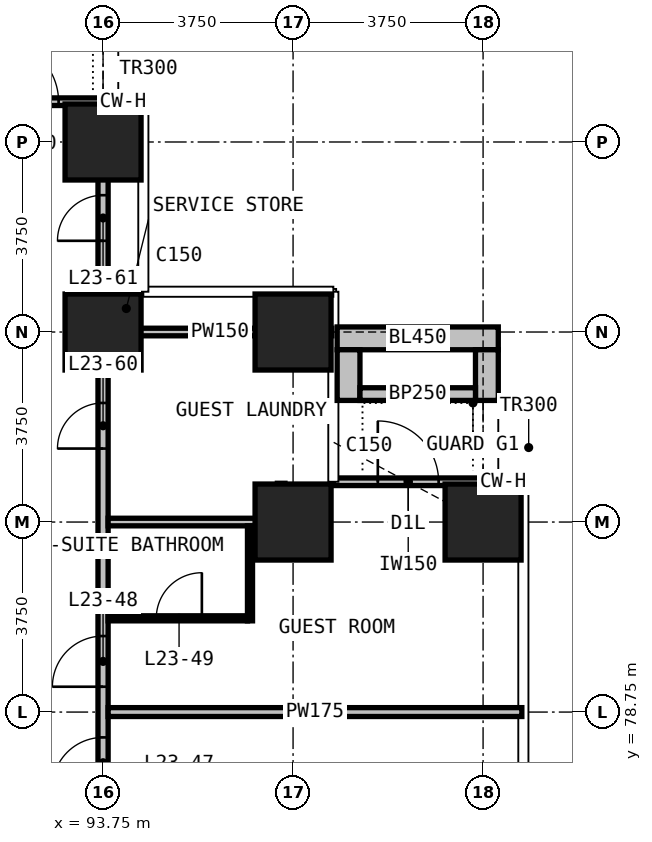
"""IFC4 building model, lengths in metres.
Left out: names, types, materials, properties, quantities, classifications, styles, units other than length and angle.
Written with IfcOpenShell. Run it as: python <this file> out.ifc"""

import sys

from ifc_helpers import new_model, si_unit, direction, frame, frame_2d, origin, origin_2d, place, context, subcontext, project, spatial, rectangle, extrude, element, fill, save


model = new_model("IFC4")
c1 = context("Model", 3, precision=1e-05, world=origin(), true_north=direction((0.0, 1.0)))
c2 = subcontext(c1, "Body", "Model", "MODEL_VIEW")
j1 = project(units=[si_unit("LENGTHUNIT", "METRE"), si_unit("PLANEANGLEUNIT", "RADIAN")], contexts=[c1])
p1 = place(None, origin())
s1 = spatial("IfcSite", under=j1, at=p1, CompositionType="ELEMENT")
p2 = place(p1, origin())
s2 = spatial("IfcBuilding", under=s1, at=p2, CompositionType="ELEMENT")
p3 = place(p2, frame((0.0, 0.0, 95.6)))
s3 = spatial("IfcBuildingStorey", under=s2, at=p3, CompositionType="ELEMENT", Elevation=95.6)
for number, where, z_axis, x_axis in (
    (1, (93.75, 86.25, 0.0), (0.0, 0.0, 1.0), (1.0, 0.0, 0.0)),
    (2, (93.75, 90.0, 0.0), (0.0, 0.0, 1.0), (1.0, 0.0, 0.0)),
    (3, (97.5, 82.5, 0.0), (0.0, 0.0, 1.0), (1.0, 0.0, 0.0)),
    (4, (97.5, 86.25, 0.0), (0.0, 0.0, 1.0), (1.0, 0.0, 0.0)),
    (5, (101.25, 82.5, 0.0), (0.0, 0.0, 1.0), (1.0, 0.0, 0.0)),
):
    element("IfcColumn", number, at=place(p3, frame(where, z_axis=z_axis, x_axis=x_axis)), inside=s3, PredefinedType="COLUMN", context=c2, shape_type="SweptSolid", body=[
        extrude(rectangle(XDim=1.5, YDim=1.5, at=origin_2d()), origin(), (0.0, 0.0, 1.0), 3.3),
    ])
p4 = place(p3, frame((98.295, 83.295, 0.0), z_axis=(0.0, 0.0, 1.0), x_axis=(1.0, 0.0, 0.0)))
e6 = element("IfcWall", 6, at=p4, inside=s3, PredefinedType="SOLIDWALL", context=c2, shape_type="SweptSolid", body=[
    extrude(rectangle(XDim=2.955, YDim=0.15, at=frame_2d((1.478, 0.0))), origin(), (0.0, 0.0, 1.0), 3.0),
])
p5 = place(p4, frame((0.877, 0.0, 0.0)))
e7 = element("IfcOpeningElement", 7, at=p5, cuts=e6, PredefinedType="OPENING", context=c2, shape_type="SweptSolid", body=[
    extrude(rectangle(XDim=1.2, YDim=2.0, at=frame_2d((0.6, 1.0))), frame((0.0, 0.085, 0.0), z_axis=(0.0, -1.0, 0.0), x_axis=(1.0, 0.0, 0.0)), (0.0, 0.0, 1.0), 0.17),
])
p6 = place(p3, frame((90.795, 90.795, 0.0), z_axis=(0.0, 0.0, 1.0), x_axis=(1.0, 0.0, 0.0)))
e8 = element("IfcWall", 8, at=p6, inside=s3, PredefinedType="SOLIDWALL", context=c2, shape_type="SweptSolid", body=[
    extrude(rectangle(XDim=2.955, YDim=0.15, at=frame_2d((1.478, 0.0))), origin(), (0.0, 0.0, 1.0), 3.0),
])
p7 = place(p6, frame((0.877, 0.0, 0.0)))
e9 = element("IfcOpeningElement", 9, at=p7, cuts=e8, PredefinedType="OPENING", context=c2, shape_type="SweptSolid", body=[
    extrude(rectangle(XDim=1.2, YDim=2.4, at=frame_2d((0.6, 1.2))), frame((0.0, 0.085, 0.0), z_axis=(0.0, -1.0, 0.0), x_axis=(1.0, 0.0, 0.0)), (0.0, 0.0, 1.0), 0.17),
])
p8 = place(p3, frame((98.37, 86.125, 0.0), z_axis=(0.0, 0.0, 1.0), x_axis=(1.0, 0.0, 0.0)))
e10 = element("IfcWall", 10, at=p8, inside=s3, PredefinedType="USERDEFINED", context=c2, shape_type="SweptSolid", body=[
    extrude(rectangle(XDim=3.18, YDim=0.45, at=frame_2d((1.59, 0.0))), origin(), (0.0, 0.0, 1.0), 1.1),
])
for number, where, z_axis, x_axis in (
    (11, (98.595, 84.9, 0.0), (0.0, 0.0, 1.0), (0.0, 1.0, 0.0)),
    (12, (101.325, 84.9, 0.0), (0.0, 0.0, 1.0), (0.0, 1.0, 0.0)),
):
    element("IfcWall", number, at=place(p3, frame(where, z_axis=z_axis, x_axis=x_axis)), inside=s3, PredefinedType="USERDEFINED", context=c2, shape_type="SweptSolid", body=[
        extrude(rectangle(XDim=1.0, YDim=0.45, at=frame_2d((0.5, 0.0))), origin(), (0.0, 0.0, 1.0), 1.1),
    ])
p9 = place(p3, frame((98.82, 85.025, 0.0), z_axis=(0.0, 0.0, 1.0), x_axis=(1.0, 0.0, 0.0)))
e13 = element("IfcWall", 13, at=p9, inside=s3, PredefinedType="USERDEFINED", context=c2, shape_type="SweptSolid", body=[
    extrude(rectangle(XDim=2.28, YDim=0.25, at=frame_2d((1.14, 0.0))), origin(), (0.0, 0.0, 1.0), 1.0),
])
p10 = place(p3, frame((93.75, 52.4, 0.0), z_axis=(0.0, 0.0, 1.0), x_axis=(0.0, 1.0, 0.0)))
e14 = element("IfcWall", 14, at=p10, inside=s3, PredefinedType="PARTITIONING", context=c2, shape_type="SweptSolid", body=[
    extrude(rectangle(XDim=38.31, YDim=0.2, at=frame_2d((19.155, 0.0))), origin(), (0.0, 0.0, 1.0), 3.0),
])
p11 = place(p10, frame((5.5, 0.0, 0.0)))
e15 = element("IfcOpeningElement", 15, at=p11, cuts=e14, PredefinedType="OPENING", context=c2, shape_type="SweptSolid", body=[
    extrude(rectangle(XDim=1.0, YDim=2.2, at=frame_2d((0.5, 1.1))), frame((0.0, 0.11, 0.0), z_axis=(0.0, -1.0, 0.0), x_axis=(1.0, 0.0, 0.0)), (0.0, 0.0, 1.0), 0.22),
])
p12 = place(p10, frame((8.1, 0.0, 0.0)))
e16 = element("IfcOpeningElement", 16, at=p12, cuts=e14, PredefinedType="OPENING", context=c2, shape_type="SweptSolid", body=[
    extrude(rectangle(XDim=1.0, YDim=2.2, at=frame_2d((0.5, 1.1))), frame((0.0, 0.11, 0.0), z_axis=(0.0, -1.0, 0.0), x_axis=(1.0, 0.0, 0.0)), (0.0, 0.0, 1.0), 0.22),
])
p13 = place(p10, frame((13.6, 0.0, 0.0)))
e17 = element("IfcOpeningElement", 17, at=p13, cuts=e14, PredefinedType="OPENING", context=c2, shape_type="SweptSolid", body=[
    extrude(rectangle(XDim=1.0, YDim=2.2, at=frame_2d((0.5, 1.1))), frame((0.0, 0.11, 0.0), z_axis=(0.0, -1.0, 0.0), x_axis=(1.0, 0.0, 0.0)), (0.0, 0.0, 1.0), 0.22),
])
p14 = place(p10, frame((16.2, 0.0, 0.0)))
e18 = element("IfcOpeningElement", 18, at=p14, cuts=e14, PredefinedType="OPENING", context=c2, shape_type="SweptSolid", body=[
    extrude(rectangle(XDim=1.0, YDim=2.2, at=frame_2d((0.5, 1.1))), frame((0.0, 0.11, 0.0), z_axis=(0.0, -1.0, 0.0), x_axis=(1.0, 0.0, 0.0)), (0.0, 0.0, 1.0), 0.22),
])
p15 = place(p10, frame((24.85, 0.0, 0.0)))
e19 = element("IfcOpeningElement", 19, at=p15, cuts=e14, PredefinedType="OPENING", context=c2, shape_type="SweptSolid", body=[
    extrude(rectangle(XDim=1.0, YDim=2.2, at=frame_2d((0.5, 1.1))), frame((0.0, 0.11, 0.0), z_axis=(0.0, -1.0, 0.0), x_axis=(1.0, 0.0, 0.0)), (0.0, 0.0, 1.0), 0.22),
])
p16 = place(p10, frame((26.85, 0.0, 0.0)))
e20 = element("IfcOpeningElement", 20, at=p16, cuts=e14, PredefinedType="OPENING", context=c2, shape_type="SweptSolid", body=[
    extrude(rectangle(XDim=1.0, YDim=2.2, at=frame_2d((0.5, 1.1))), frame((0.0, 0.11, 0.0), z_axis=(0.0, -1.0, 0.0), x_axis=(1.0, 0.0, 0.0)), (0.0, 0.0, 1.0), 0.22),
])
p17 = place(p10, frame((31.55, 0.0, 0.0)))
e21 = element("IfcOpeningElement", 21, at=p17, cuts=e14, PredefinedType="OPENING", context=c2, shape_type="SweptSolid", body=[
    extrude(rectangle(XDim=0.9, YDim=2.2, at=frame_2d((0.45, 1.1))), frame((0.0, 0.11, 0.0), z_axis=(0.0, -1.0, 0.0), x_axis=(1.0, 0.0, 0.0)), (0.0, 0.0, 1.0), 0.22),
])
p18 = place(p10, frame((35.65, 0.0, 0.0)))
e22 = element("IfcOpeningElement", 22, at=p18, cuts=e14, PredefinedType="OPENING", context=c2, shape_type="SweptSolid", body=[
    extrude(rectangle(XDim=0.9, YDim=2.2, at=frame_2d((0.45, 1.1))), frame((0.0, 0.11, 0.0), z_axis=(0.0, -1.0, 0.0), x_axis=(1.0, 0.0, 0.0)), (0.0, 0.0, 1.0), 0.22),
])
p19 = place(p3, frame((93.85, 78.75, 0.0), z_axis=(0.0, 0.0, 1.0), x_axis=(1.0, 0.0, 0.0)))
e23 = element("IfcWall", 23, at=p19, inside=s3, PredefinedType="PARTITIONING", context=c2, shape_type="SweptSolid", body=[
    extrude(rectangle(XDim=8.165, YDim=0.175, at=frame_2d((4.083, 0.0))), origin(), (0.0, 0.0, 1.0), 3.0),
])
p20 = place(p3, frame((93.85, 82.5, 0.0), z_axis=(0.0, 0.0, 1.0), x_axis=(1.0, 0.0, 0.0)))
e24 = element("IfcWall", 24, at=p20, inside=s3, PredefinedType="PARTITIONING", context=c2, shape_type="SweptSolid", body=[
    extrude(rectangle(XDim=3.34, YDim=0.15, at=frame_2d((1.67, 0.0))), origin(), (0.0, 0.0, 1.0), 3.0),
])
p21 = place(p3, frame((93.85, 86.25, 0.0), z_axis=(0.0, 0.0, 1.0), x_axis=(1.0, 0.0, 0.0)))
e25 = element("IfcWall", 25, at=p21, inside=s3, PredefinedType="PARTITIONING", context=c2, shape_type="SweptSolid", body=[
    extrude(rectangle(XDim=4.415, YDim=0.15, at=frame_2d((2.208, 0.0))), origin(), (0.0, 0.0, 1.0), 3.0),
])
p22 = place(p3, frame((97.265, 82.425, 0.0), z_axis=(0.0, 0.0, 1.0), x_axis=(0.0, 1.0, 0.0)))
e26 = element("IfcWall", 26, at=p22, inside=s3, PredefinedType="PARTITIONING", context=c2, shape_type="SweptSolid", body=[
    extrude(rectangle(XDim=0.84, YDim=0.15, at=frame_2d((0.42, 0.0))), origin(), (0.0, 0.0, 1.0), 3.0),
])
p23 = place(p3, frame((93.85, 80.6, 0.0), z_axis=(0.0, 0.0, 1.0), x_axis=(1.0, 0.0, 0.0)))
e27 = element("IfcWall", 27, at=p23, inside=s3, PredefinedType="PARTITIONING", context=c2, shape_type="SweptSolid", body=[
    extrude(rectangle(XDim=2.75, YDim=0.1, at=frame_2d((1.375, 0.0))), origin(), (0.0, 0.0, 1.0), 3.0),
])
p24 = place(p23, frame((0.95, 0.0, 0.0)))
e28 = element("IfcOpeningElement", 28, at=p24, cuts=e27, PredefinedType="OPENING", context=c2, shape_type="SweptSolid", body=[
    extrude(rectangle(XDim=0.9, YDim=2.2, at=frame_2d((0.45, 1.1))), frame((0.0, 0.06, 0.0), z_axis=(0.0, -1.0, 0.0), x_axis=(1.0, 0.0, 0.0)), (0.0, 0.0, 1.0), 0.12),
])
p25 = place(p3, frame((96.65, 80.55, 0.0), z_axis=(0.0, 0.0, 1.0), x_axis=(0.0, 1.0, 0.0)))
e29 = element("IfcWall", 29, at=p25, inside=s3, PredefinedType="PARTITIONING", context=c2, shape_type="SweptSolid", body=[
    extrude(rectangle(XDim=1.875, YDim=0.1, at=frame_2d((0.938, 0.0))), origin(), (0.0, 0.0, 1.0), 3.0),
])
p26 = place(p5, origin())
e30 = element("IfcDoor", 30, at=p26, inside=s3, OperationType="SINGLE_SWING_LEFT", PredefinedType="DOOR", context=c2, shape_type="SweptSolid", body=[
    extrude(rectangle(XDim=1.2, YDim=2.0, at=frame_2d((0.6, 1.0))), frame((0.0, 0.025, 0.0), z_axis=(0.0, -1.0, 0.0), x_axis=(1.0, 0.0, 0.0)), (0.0, 0.0, 1.0), 0.05),
])
fill(e7, e30)
p27 = place(p7, origin())
e31 = element("IfcDoor", 31, at=p27, inside=s3, OperationType="SINGLE_SWING_LEFT", PredefinedType="DOOR", context=c2, shape_type="SweptSolid", body=[
    extrude(rectangle(XDim=1.2, YDim=2.4, at=frame_2d((0.6, 1.2))), frame((0.0, 0.025, 0.0), z_axis=(0.0, -1.0, 0.0), x_axis=(1.0, 0.0, 0.0)), (0.0, 0.0, 1.0), 0.05),
])
fill(e9, e31)
p28 = place(p15, origin())
e32 = element("IfcDoor", 32, at=p28, inside=s3, OperationType="SINGLE_SWING_RIGHT", PredefinedType="DOOR", context=c2, shape_type="SweptSolid", body=[
    extrude(rectangle(XDim=1.0, YDim=2.2, at=frame_2d((0.5, 1.1))), frame((0.0, 0.025, 0.0), z_axis=(0.0, -1.0, 0.0), x_axis=(1.0, 0.0, 0.0)), (0.0, 0.0, 1.0), 0.05),
])
fill(e19, e32)
p29 = place(p16, origin())
e33 = element("IfcDoor", 33, at=p29, inside=s3, OperationType="SINGLE_SWING_LEFT", PredefinedType="DOOR", context=c2, shape_type="SweptSolid", body=[
    extrude(rectangle(XDim=1.0, YDim=2.2, at=frame_2d((0.5, 1.1))), frame((0.0, 0.025, 0.0), z_axis=(0.0, -1.0, 0.0), x_axis=(1.0, 0.0, 0.0)), (0.0, 0.0, 1.0), 0.05),
])
fill(e20, e33)
p30 = place(p24, origin())
e34 = element("IfcDoor", 34, at=p30, inside=s3, OperationType="SINGLE_SWING_RIGHT", PredefinedType="DOOR", context=c2, shape_type="SweptSolid", body=[
    extrude(rectangle(XDim=0.9, YDim=2.2, at=frame_2d((0.45, 1.1))), frame((0.0, 0.025, 0.0), z_axis=(0.0, -1.0, 0.0), x_axis=(1.0, 0.0, 0.0)), (0.0, 0.0, 1.0), 0.05),
])
fill(e28, e34)
p31 = place(p17, origin())
e35 = element("IfcDoor", 35, at=p31, inside=s3, OperationType="SINGLE_SWING_RIGHT", PredefinedType="DOOR", context=c2, shape_type="SweptSolid", body=[
    extrude(rectangle(XDim=0.9, YDim=2.2, at=frame_2d((0.45, 1.1))), frame((0.0, 0.025, 0.0), z_axis=(0.0, -1.0, 0.0), x_axis=(1.0, 0.0, 0.0)), (0.0, 0.0, 1.0), 0.05),
])
fill(e21, e35)
p32 = place(p18, origin())
e36 = element("IfcDoor", 36, at=p32, inside=s3, OperationType="SINGLE_SWING_LEFT", PredefinedType="DOOR", context=c2, shape_type="SweptSolid", body=[
    extrude(rectangle(XDim=0.9, YDim=2.2, at=frame_2d((0.45, 1.1))), frame((0.0, 0.025, 0.0), z_axis=(0.0, -1.0, 0.0), x_axis=(1.0, 0.0, 0.0)), (0.0, 0.0, 1.0), 0.05),
])
fill(e22, e36)
save(model, sys.argv[1])
